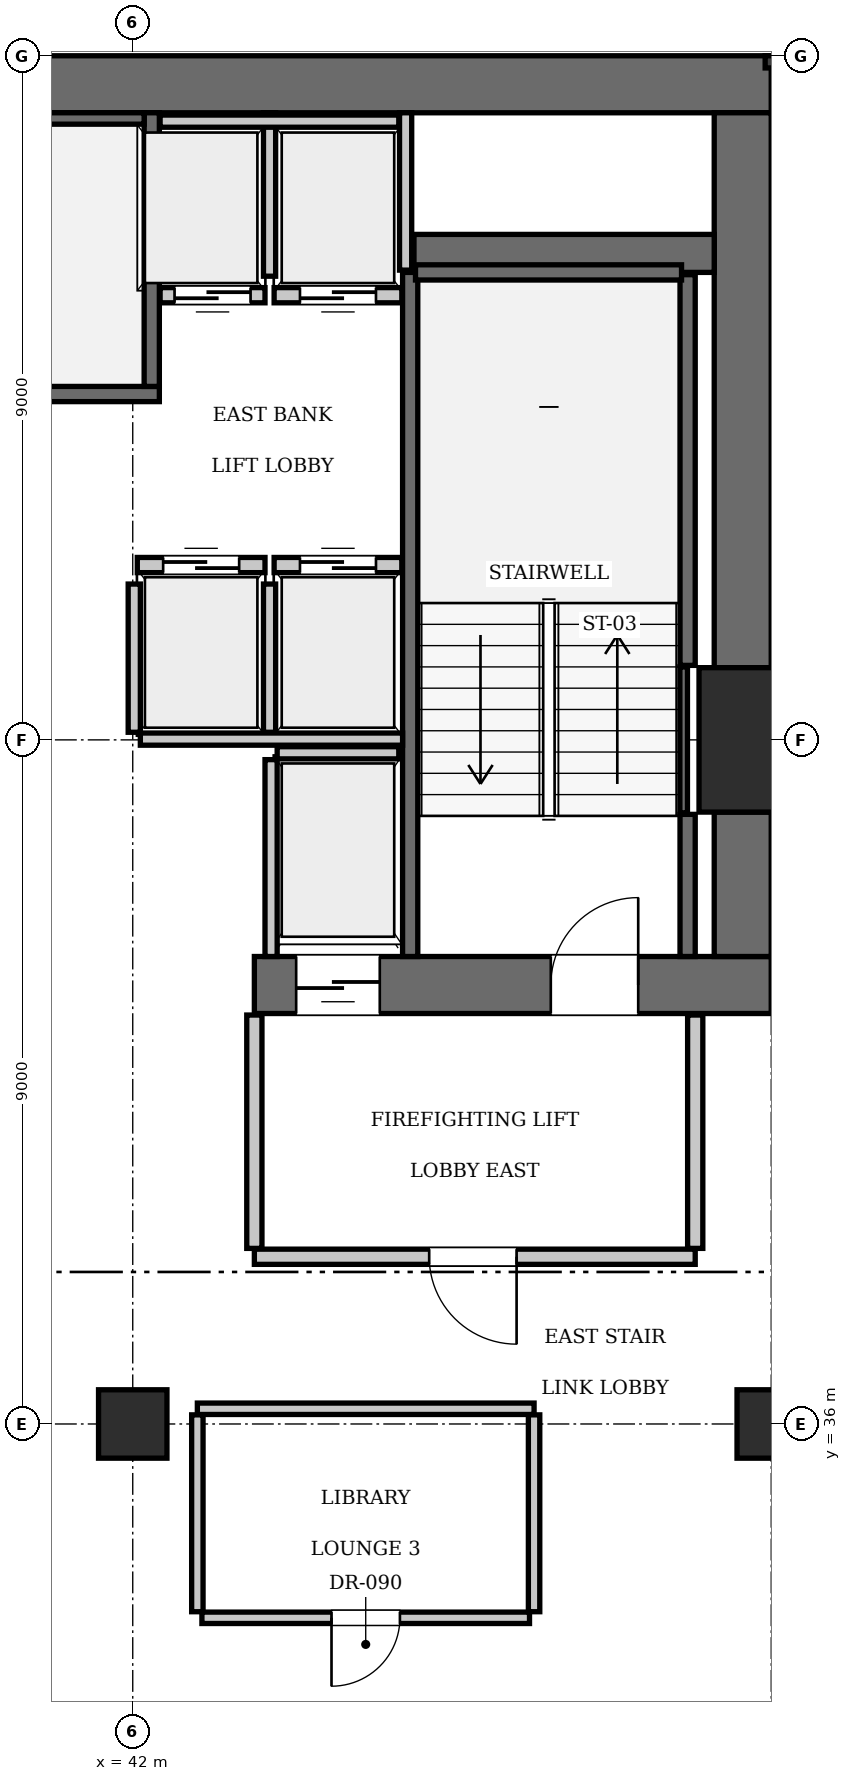
"""IFC4 building model, lengths in metres.
Left out: names, types, materials, properties, quantities, classifications, styles, units other than length and angle.
Written with IfcOpenShell. Run it as: python <this file> out.ifc"""

import sys

from ifc_helpers import new_model, si_unit, direction, frame, frame_2d, origin, origin_2d, place, context, subcontext, project, spatial, rectangle, extrude, element, fill, save


model = new_model("IFC4")
c1 = context("Model", 3, precision=1e-05, world=origin(), true_north=direction((0.0, 1.0)))
c2 = subcontext(c1, "Body", "Model", "MODEL_VIEW")
j1 = project(units=[si_unit("LENGTHUNIT", "METRE"), si_unit("PLANEANGLEUNIT", "RADIAN")], contexts=[c1])
p1 = place(None, origin())
s1 = spatial("IfcSite", under=j1, at=p1, CompositionType="ELEMENT")
p2 = place(p1, origin())
s2 = spatial("IfcBuilding", under=s1, at=p2, CompositionType="ELEMENT")
p3 = place(p2, frame((0.0, 0.0, 185.15)))
s3 = spatial("IfcBuildingStorey", under=s2, at=p3, CompositionType="ELEMENT", Elevation=185.15)
p4 = place(p3, frame((50.4, 45.0, 0.0), z_axis=(0.0, 0.0, 1.0), x_axis=(1.0, 0.0, 0.0)))
e1 = element("IfcColumn", 1, at=p4, inside=s3, PredefinedType="COLUMN", context=c2, shape_type="SweptSolid", body=[
    extrude(rectangle(XDim=1.9, YDim=1.9, at=origin_2d()), origin(), (0.0, 0.0, 1.0), 3.85),
])
p5 = place(p3, frame((25.2, 53.625, 0.0), z_axis=(0.0, 0.0, 1.0), x_axis=(1.0, 0.0, 0.0)))
e2 = element("IfcWall", 2, at=p5, inside=s3, PredefinedType="SHEAR", context=c2, shape_type="SweptSolid", body=[
    extrude(rectangle(XDim=25.2, YDim=0.75, at=frame_2d((12.6, 0.0))), origin(), (0.0, 0.0, 1.0), 3.85),
])
p6 = place(p3, frame((43.6, 41.775, 0.0), z_axis=(0.0, 0.0, 1.0), x_axis=(1.0, 0.0, 0.0)))
e3 = element("IfcWall", 3, at=p6, inside=s3, PredefinedType="SHEAR", context=c2, shape_type="SweptSolid", body=[
    extrude(rectangle(XDim=6.8, YDim=0.75, at=frame_2d((3.4, 0.0))), origin(), (0.0, 0.0, 1.0), 3.85),
])
p7 = place(p6, frame((3.9, 0.0, 0.0)))
e4 = element("IfcOpeningElement", 4, at=p7, cuts=e3, PredefinedType="OPENING", context=c2, shape_type="SweptSolid", body=[
    extrude(rectangle(XDim=1.15, YDim=2.15, at=frame_2d((0.575, 1.075))), frame((0.0, 0.385, 0.0), z_axis=(0.0, -1.0, 0.0), x_axis=(1.0, 0.0, 0.0)), (0.0, 0.0, 1.0), 0.77),
])
p8 = place(p6, frame((0.55, 0.0, 0.0)))
e5 = element("IfcOpeningElement", 5, at=p8, cuts=e3, PredefinedType="OPENING", context=c2, shape_type="SweptSolid", body=[
    extrude(rectangle(XDim=1.1, YDim=2.2, at=frame_2d((0.55, 1.1))), frame((0.0, 0.385, 0.0), z_axis=(0.0, -1.0, 0.0), x_axis=(1.0, 0.0, 0.0)), (0.0, 0.0, 1.0), 0.77),
])
p9 = place(p3, frame((50.025, 42.15, 0.0), z_axis=(0.0, 0.0, 1.0), x_axis=(0.0, 1.0, 0.0)))
e6 = element("IfcWall", 6, at=p9, inside=s3, PredefinedType="SHEAR", context=c2, shape_type="SweptSolid", body=[
    extrude(rectangle(XDim=1.9, YDim=0.75, at=frame_2d((0.95, 0.0))), origin(), (0.0, 0.0, 1.0), 3.85),
])
p10 = place(p3, frame((50.025, 45.95, 0.0), z_axis=(0.0, 0.0, 1.0), x_axis=(0.0, 1.0, 0.0)))
e7 = element("IfcWall", 7, at=p10, inside=s3, PredefinedType="SHEAR", context=c2, shape_type="SweptSolid", body=[
    extrude(rectangle(XDim=7.3, YDim=0.75, at=frame_2d((3.65, 0.0))), origin(), (0.0, 0.0, 1.0), 3.85),
])
p11 = place(p3, frame((45.7, 51.4, 0.0), z_axis=(0.0, 0.0, 1.0), x_axis=(1.0, 0.0, 0.0)))
e8 = element("IfcWall", 8, at=p11, inside=s3, PredefinedType="SHEAR", context=c2, shape_type="SweptSolid", body=[
    extrude(rectangle(XDim=3.95, YDim=0.5, at=frame_2d((1.975, 0.0))), origin(), (0.0, 0.0, 1.0), 3.85),
])
for number, where, z_axis, x_axis in (
    (9, (42.0, 36.0, 0.0), (0.0, 0.0, 1.0), (1.0, 0.0, 0.0)),
    (10, (50.4, 36.0, 0.0), (0.0, 0.0, 1.0), (1.0, 0.0, 0.0)),
):
    element("IfcColumn", number, at=place(p3, frame(where, z_axis=z_axis, x_axis=x_axis)), inside=s3, PredefinedType="COLUMN", context=c2, shape_type="SweptSolid", body=[
        extrude(rectangle(XDim=0.9, YDim=0.9, at=origin_2d()), origin(), (0.0, 0.0, 1.0), 3.85),
    ])
p12 = place(p3, frame((33.25, 49.55, 0.0), z_axis=(0.0, 0.0, 1.0), x_axis=(1.0, 0.0, 0.0)))
e11 = element("IfcWall", 11, at=p12, inside=s3, PredefinedType="SOLIDWALL", context=c2, shape_type="SweptSolid", body=[
    extrude(rectangle(XDim=9.1, YDim=0.2, at=frame_2d((4.55, 0.0))), origin(), (0.0, 0.0, 1.0), 3.61),
])
p13 = place(p3, frame((42.25, 49.65, 0.0), z_axis=(0.0, 0.0, 1.0), x_axis=(0.0, 1.0, 0.0)))
e12 = element("IfcWall", 12, at=p13, inside=s3, PredefinedType="SOLIDWALL", context=c2, shape_type="SweptSolid", body=[
    extrude(rectangle(XDim=3.6, YDim=0.2, at=frame_2d((1.8, 0.0))), origin(), (0.0, 0.0, 1.0), 3.61),
])
p14 = place(p3, frame((33.45, 53.175, 0.0), z_axis=(0.0, 0.0, 1.0), x_axis=(1.0, 0.0, 0.0)))
e13 = element("IfcWall", 13, at=p14, inside=s3, PredefinedType="SOLIDWALL", context=c2, shape_type="SweptSolid", body=[
    extrude(rectangle(XDim=8.7, YDim=0.15, at=frame_2d((4.35, 0.0))), origin(), (0.0, 0.0, 1.0), 3.61),
])
p15 = place(p3, frame((45.65, 42.15, 0.0), z_axis=(0.0, 0.0, 1.0), x_axis=(0.0, 1.0, 0.0)))
e14 = element("IfcWall", 14, at=p15, inside=s3, PredefinedType="SOLIDWALL", context=c2, shape_type="SweptSolid", body=[
    extrude(rectangle(XDim=9.0, YDim=0.2, at=frame_2d((4.5, 0.0))), origin(), (0.0, 0.0, 1.0), 3.61),
])
p16 = place(p3, frame((49.3, 42.15, 0.0), z_axis=(0.0, 0.0, 1.0), x_axis=(0.0, 1.0, 0.0)))
e15 = element("IfcWall", 15, at=p16, inside=s3, PredefinedType="SOLIDWALL", context=c2, shape_type="SweptSolid", body=[
    extrude(rectangle(XDim=1.87, YDim=0.2, at=frame_2d((0.935, 0.0))), origin(), (0.0, 0.0, 1.0), 3.61),
])
p17 = place(p3, frame((49.3, 45.98, 0.0), z_axis=(0.0, 0.0, 1.0), x_axis=(0.0, 1.0, 0.0)))
e16 = element("IfcWall", 16, at=p17, inside=s3, PredefinedType="SOLIDWALL", context=c2, shape_type="SweptSolid", body=[
    extrude(rectangle(XDim=5.14, YDim=0.2, at=frame_2d((2.57, 0.0))), origin(), (0.0, 0.0, 1.0), 3.61),
])
p18 = place(p3, frame((45.72, 51.15, 0.0), z_axis=(0.0, 0.0, 1.0), x_axis=(1.0, 0.0, 0.0)))
e17 = element("IfcWall", 17, at=p18, inside=s3, PredefinedType="SOLIDWALL", context=c2, shape_type="SweptSolid", body=[
    extrude(rectangle(XDim=3.5, YDim=0.2, at=frame_2d((1.75, 0.0))), origin(), (0.0, 0.0, 1.0), 3.61),
])
p19 = place(p3, frame((49.248, 44.04, 0.0), z_axis=(0.0, 0.0, 1.0), x_axis=(0.0, 1.0, 0.0)))
e18 = element("IfcWall", 18, at=p19, inside=s3, PredefinedType="SOLIDWALL", context=c2, shape_type="SweptSolid", body=[
    extrude(rectangle(XDim=1.92, YDim=0.1, at=frame_2d((0.96, 0.0))), origin(), (0.0, 0.0, 1.0), 3.61),
])
p20 = place(p3, frame((42.06, 47.3, 0.0), z_axis=(0.0, 0.0, 1.0), x_axis=(1.0, 0.0, 0.0)))
e19 = element("IfcWall", 19, at=p20, inside=s3, PredefinedType="SOLIDWALL", context=c2, shape_type="SweptSolid", body=[
    extrude(rectangle(XDim=1.68, YDim=0.2, at=frame_2d((0.84, 0.0))), origin(), (0.0, 0.0, 1.0), 3.61),
])
p21 = place(p20, frame((0.34, 0.0, 0.0)))
e20 = element("IfcOpeningElement", 20, at=p21, cuts=e19, PredefinedType="OPENING", context=c2, shape_type="SweptSolid", body=[
    extrude(rectangle(XDim=1.0, YDim=2.15, at=frame_2d((0.5, 1.075))), frame((0.0, 0.11, 0.0), z_axis=(0.0, -1.0, 0.0), x_axis=(1.0, 0.0, 0.0)), (0.0, 0.0, 1.0), 0.22),
])
p22 = place(p3, frame((43.86, 47.3, 0.0), z_axis=(0.0, 0.0, 1.0), x_axis=(1.0, 0.0, 0.0)))
e21 = element("IfcWall", 21, at=p22, inside=s3, PredefinedType="SOLIDWALL", context=c2, shape_type="SweptSolid", body=[
    extrude(rectangle(XDim=1.68, YDim=0.2, at=frame_2d((0.84, 0.0))), origin(), (0.0, 0.0, 1.0), 3.61),
])
p23 = place(p22, frame((0.34, 0.0, 0.0)))
e22 = element("IfcOpeningElement", 22, at=p23, cuts=e21, PredefinedType="OPENING", context=c2, shape_type="SweptSolid", body=[
    extrude(rectangle(XDim=1.0, YDim=2.15, at=frame_2d((0.5, 1.075))), frame((0.0, 0.11, 0.0), z_axis=(0.0, -1.0, 0.0), x_axis=(1.0, 0.0, 0.0)), (0.0, 0.0, 1.0), 0.22),
])
p24 = place(p3, frame((42.36, 50.85, 0.0), z_axis=(0.0, 0.0, 1.0), x_axis=(1.0, 0.0, 0.0)))
e23 = element("IfcWall", 23, at=p24, inside=s3, PredefinedType="SOLIDWALL", context=c2, shape_type="SweptSolid", body=[
    extrude(rectangle(XDim=1.38, YDim=0.2, at=frame_2d((0.69, 0.0))), origin(), (0.0, 0.0, 1.0), 3.61),
])
p25 = place(p24, frame((0.19, 0.0, 0.0)))
e24 = element("IfcOpeningElement", 24, at=p25, cuts=e23, PredefinedType="OPENING", context=c2, shape_type="SweptSolid", body=[
    extrude(rectangle(XDim=1.0, YDim=2.15, at=frame_2d((0.5, 1.075))), frame((0.0, 0.11, 0.0), z_axis=(0.0, -1.0, 0.0), x_axis=(1.0, 0.0, 0.0)), (0.0, 0.0, 1.0), 0.22),
])
p26 = place(p3, frame((43.86, 50.85, 0.0), z_axis=(0.0, 0.0, 1.0), x_axis=(1.0, 0.0, 0.0)))
e25 = element("IfcWall", 25, at=p26, inside=s3, PredefinedType="SOLIDWALL", context=c2, shape_type="SweptSolid", body=[
    extrude(rectangle(XDim=1.68, YDim=0.2, at=frame_2d((0.84, 0.0))), origin(), (0.0, 0.0, 1.0), 3.61),
])
p27 = place(p26, frame((0.34, 0.0, 0.0)))
e26 = element("IfcOpeningElement", 26, at=p27, cuts=e25, PredefinedType="OPENING", context=c2, shape_type="SweptSolid", body=[
    extrude(rectangle(XDim=1.0, YDim=2.15, at=frame_2d((0.5, 1.075))), frame((0.0, 0.11, 0.0), z_axis=(0.0, -1.0, 0.0), x_axis=(1.0, 0.0, 0.0)), (0.0, 0.0, 1.0), 0.22),
])
p28 = place(p3, frame((43.9, 44.83, 0.0), z_axis=(0.0, 0.0, 1.0), x_axis=(1.0, 0.0, 0.0)))
e27 = element("IfcWall", 27, at=p28, inside=s3, PredefinedType="SOLIDWALL", context=c2, shape_type="SweptSolid", body=[
    extrude(rectangle(XDim=1.6, YDim=0.16, at=frame_2d((0.8, 0.0))), origin(), (0.0, 0.0, 1.0), 3.61),
])
p29 = place(p3, frame((43.82, 42.15, 0.0), z_axis=(0.0, 0.0, 1.0), x_axis=(0.0, 1.0, 0.0)))
e28 = element("IfcWall", 28, at=p29, inside=s3, PredefinedType="SOLIDWALL", context=c2, shape_type="SweptSolid", body=[
    extrude(rectangle(XDim=2.59, YDim=0.16, at=frame_2d((1.295, 0.0))), origin(), (0.0, 0.0, 1.0), 3.61),
])
for number, where, z_axis, x_axis in (
    (29, (42.02, 45.1, 0.0), (0.0, 0.0, 1.0), (0.0, 1.0, 0.0)),
    (30, (43.8, 45.1, 0.0), (0.0, 0.0, 1.0), (0.0, 1.0, 0.0)),
):
    element("IfcWall", number, at=place(p3, frame(where, z_axis=z_axis, x_axis=x_axis)), inside=s3, PredefinedType="SOLIDWALL", context=c2, shape_type="SweptSolid", body=[
        extrude(rectangle(XDim=1.95, YDim=0.16, at=frame_2d((0.975, 0.0))), origin(), (0.0, 0.0, 1.0), 3.61),
    ])
p30 = place(p3, frame((42.1, 45.01, 0.0), z_axis=(0.0, 0.0, 1.0), x_axis=(1.0, 0.0, 0.0)))
e31 = element("IfcWall", 31, at=p30, inside=s3, PredefinedType="SOLIDWALL", context=c2, shape_type="SweptSolid", body=[
    extrude(rectangle(XDim=3.45, YDim=0.16, at=frame_2d((1.725, 0.0))), origin(), (0.0, 0.0, 1.0), 3.61),
])
p31 = place(p3, frame((45.59, 51.18, 0.0), z_axis=(0.0, 0.0, 1.0), x_axis=(0.0, 1.0, 0.0)))
e32 = element("IfcWall", 32, at=p31, inside=s3, PredefinedType="SOLIDWALL", context=c2, shape_type="SweptSolid", body=[
    extrude(rectangle(XDim=2.07, YDim=0.16, at=frame_2d((1.035, 0.0))), origin(), (0.0, 0.0, 1.0), 3.61),
])
p32 = place(p3, frame((43.8, 51.1, 0.0), z_axis=(0.0, 0.0, 1.0), x_axis=(0.0, 1.0, 0.0)))
e33 = element("IfcWall", 33, at=p32, inside=s3, PredefinedType="SOLIDWALL", context=c2, shape_type="SweptSolid", body=[
    extrude(rectangle(XDim=2.15, YDim=0.16, at=frame_2d((1.075, 0.0))), origin(), (0.0, 0.0, 1.0), 3.61),
])
p33 = place(p3, frame((42.36, 53.14, 0.0), z_axis=(0.0, 0.0, 1.0), x_axis=(1.0, 0.0, 0.0)))
e34 = element("IfcWall", 34, at=p33, inside=s3, PredefinedType="SOLIDWALL", context=c2, shape_type="SweptSolid", body=[
    extrude(rectangle(XDim=3.14, YDim=0.16, at=frame_2d((1.57, 0.0))), origin(), (0.0, 0.0, 1.0), 3.61),
])
p34 = place(p3, frame((43.6, 38.2, 0.0), z_axis=(0.0, 0.0, 1.0), x_axis=(1.0, 0.0, 0.0)))
e35 = element("IfcWall", 35, at=p34, inside=s3, PredefinedType="PARTITIONING", context=c2, shape_type="SweptSolid", body=[
    extrude(rectangle(XDim=5.8, YDim=0.2, at=frame_2d((2.9, 0.0))), origin(), (0.0, 0.0, 1.0), 3.61),
])
p35 = place(p34, frame((2.3, 0.0, 0.0)))
e36 = element("IfcOpeningElement", 36, at=p35, cuts=e35, PredefinedType="OPENING", context=c2, shape_type="SweptSolid", body=[
    extrude(rectangle(XDim=1.15, YDim=2.15, at=frame_2d((0.575, 1.075))), frame((0.0, 0.11, 0.0), z_axis=(0.0, -1.0, 0.0), x_axis=(1.0, 0.0, 0.0)), (0.0, 0.0, 1.0), 0.22),
])
for number, where, z_axis, x_axis in (
    (37, (43.6, 38.31, 0.0), (0.0, 0.0, 1.0), (0.0, 1.0, 0.0)),
    (38, (49.4, 38.31, 0.0), (0.0, 0.0, 1.0), (0.0, 1.0, 0.0)),
):
    element("IfcWall", number, at=place(p3, frame(where, z_axis=z_axis, x_axis=x_axis)), inside=s3, PredefinedType="PARTITIONING", context=c2, shape_type="SweptSolid", body=[
        extrude(rectangle(XDim=3.07, YDim=0.2, at=frame_2d((1.535, 0.0))), origin(), (0.0, 0.0, 1.0), 3.61),
    ])
p36 = place(p3, frame((42.85, 36.2, 0.0), z_axis=(0.0, 0.0, 1.0), x_axis=(1.0, 0.0, 0.0)))
e39 = element("IfcWall", 39, at=p36, inside=s3, PredefinedType="PARTITIONING", context=c2, shape_type="SweptSolid", body=[
    extrude(rectangle(XDim=4.43, YDim=0.15, at=frame_2d((2.215, 0.0))), origin(), (0.0, 0.0, 1.0), 3.61),
])
for number, where, z_axis, x_axis in (
    (40, (42.85, 33.53, 0.0), (0.0, 0.0, 1.0), (0.0, 1.0, 0.0)),
    (41, (47.28, 33.53, 0.0), (0.0, 0.0, 1.0), (0.0, 1.0, 0.0)),
):
    element("IfcWall", number, at=place(p3, frame(where, z_axis=z_axis, x_axis=x_axis)), inside=s3, PredefinedType="PARTITIONING", context=c2, shape_type="SweptSolid", body=[
        extrude(rectangle(XDim=2.59, YDim=0.15, at=frame_2d((1.295, 0.0))), origin(), (0.0, 0.0, 1.0), 3.61),
    ])
p37 = place(p3, frame((42.91, 33.45, 0.0), z_axis=(0.0, 0.0, 1.0), x_axis=(1.0, 0.0, 0.0)))
e42 = element("IfcWall", 42, at=p37, inside=s3, PredefinedType="PARTITIONING", context=c2, shape_type="SweptSolid", body=[
    extrude(rectangle(XDim=4.31, YDim=0.15, at=frame_2d((2.155, 0.0))), origin(), (0.0, 0.0, 1.0), 3.61),
])
p38 = place(p37, frame((1.705, 0.0, 0.0)))
e43 = element("IfcOpeningElement", 43, at=p38, cuts=e42, PredefinedType="OPENING", context=c2, shape_type="SweptSolid", body=[
    extrude(rectangle(XDim=0.9, YDim=2.1, at=frame_2d((0.45, 1.05))), frame((0.0, 0.085, 0.0), z_axis=(0.0, -1.0, 0.0), x_axis=(1.0, 0.0, 0.0)), (0.0, 0.0, 1.0), 0.17),
])
p39 = place(p7, origin())
e44 = element("IfcDoor", 44, at=p39, inside=s3, OperationType="SINGLE_SWING_RIGHT", PredefinedType="DOOR", context=c2, shape_type="SweptSolid", body=[
    extrude(rectangle(XDim=1.15, YDim=2.15, at=frame_2d((0.575, 1.075))), frame((0.0, 0.025, 0.0), z_axis=(0.0, -1.0, 0.0), x_axis=(1.0, 0.0, 0.0)), (0.0, 0.0, 1.0), 0.05),
])
fill(e4, e44)
p40 = place(p21, origin())
e45 = element("IfcDoor", 45, at=p40, inside=s3, OperationType="SLIDING_TO_LEFT", PredefinedType="DOOR", context=c2, shape_type="SweptSolid", body=[
    extrude(rectangle(XDim=1.0, YDim=2.15, at=frame_2d((0.5, 1.075))), frame((0.0, 0.025, 0.0), z_axis=(0.0, -1.0, 0.0), x_axis=(1.0, 0.0, 0.0)), (0.0, 0.0, 1.0), 0.05),
])
fill(e20, e45)
p41 = place(p23, origin())
e46 = element("IfcDoor", 46, at=p41, inside=s3, OperationType="SLIDING_TO_LEFT", PredefinedType="DOOR", context=c2, shape_type="SweptSolid", body=[
    extrude(rectangle(XDim=1.0, YDim=2.15, at=frame_2d((0.5, 1.075))), frame((0.0, 0.025, 0.0), z_axis=(0.0, -1.0, 0.0), x_axis=(1.0, 0.0, 0.0)), (0.0, 0.0, 1.0), 0.05),
])
fill(e22, e46)
p42 = place(p25, frame((1.0, 0.0, 0.0), z_axis=(0.0, 0.0, 1.0), x_axis=(-1.0, 0.0, 0.0)))
e47 = element("IfcDoor", 47, at=p42, inside=s3, OperationType="SLIDING_TO_LEFT", PredefinedType="DOOR", context=c2, shape_type="SweptSolid", body=[
    extrude(rectangle(XDim=1.0, YDim=2.15, at=frame_2d((0.5, 1.075))), frame((0.0, 0.025, 0.0), z_axis=(0.0, -1.0, 0.0), x_axis=(1.0, 0.0, 0.0)), (0.0, 0.0, 1.0), 0.05),
])
fill(e24, e47)
p43 = place(p27, frame((1.0, 0.0, 0.0), z_axis=(0.0, 0.0, 1.0), x_axis=(-1.0, 0.0, 0.0)))
e48 = element("IfcDoor", 48, at=p43, inside=s3, OperationType="SLIDING_TO_LEFT", PredefinedType="DOOR", context=c2, shape_type="SweptSolid", body=[
    extrude(rectangle(XDim=1.0, YDim=2.15, at=frame_2d((0.5, 1.075))), frame((0.0, 0.025, 0.0), z_axis=(0.0, -1.0, 0.0), x_axis=(1.0, 0.0, 0.0)), (0.0, 0.0, 1.0), 0.05),
])
fill(e26, e48)
p44 = place(p8, frame((1.1, 0.0, 0.0), z_axis=(0.0, 0.0, 1.0), x_axis=(-1.0, 0.0, 0.0)))
e49 = element("IfcDoor", 49, at=p44, inside=s3, OperationType="SLIDING_TO_LEFT", PredefinedType="DOOR", context=c2, shape_type="SweptSolid", body=[
    extrude(rectangle(XDim=1.1, YDim=2.2, at=frame_2d((0.55, 1.1))), frame((0.0, 0.025, 0.0), z_axis=(0.0, -1.0, 0.0), x_axis=(1.0, 0.0, 0.0)), (0.0, 0.0, 1.0), 0.05),
])
fill(e5, e49)
p45 = place(p35, frame((1.15, 0.0, 0.0), z_axis=(0.0, 0.0, 1.0), x_axis=(-1.0, 0.0, 0.0)))
e50 = element("IfcDoor", 50, at=p45, inside=s3, OperationType="SINGLE_SWING_LEFT", PredefinedType="DOOR", context=c2, shape_type="SweptSolid", body=[
    extrude(rectangle(XDim=1.15, YDim=2.15, at=frame_2d((0.575, 1.075))), frame((0.0, 0.025, 0.0), z_axis=(0.0, -1.0, 0.0), x_axis=(1.0, 0.0, 0.0)), (0.0, 0.0, 1.0), 0.05),
])
fill(e36, e50)
p46 = place(p38, frame((0.9, 0.0, 0.0), z_axis=(0.0, 0.0, 1.0), x_axis=(-1.0, 0.0, 0.0)))
e51 = element("IfcDoor", 51, at=p46, inside=s3, OperationType="SINGLE_SWING_RIGHT", PredefinedType="DOOR", context=c2, shape_type="SweptSolid", body=[
    extrude(rectangle(XDim=0.9, YDim=2.1, at=frame_2d((0.45, 1.05))), frame((0.0, 0.025, 0.0), z_axis=(0.0, -1.0, 0.0), x_axis=(1.0, 0.0, 0.0)), (0.0, 0.0, 1.0), 0.05),
])
fill(e43, e51)
save(model, sys.argv[1])
